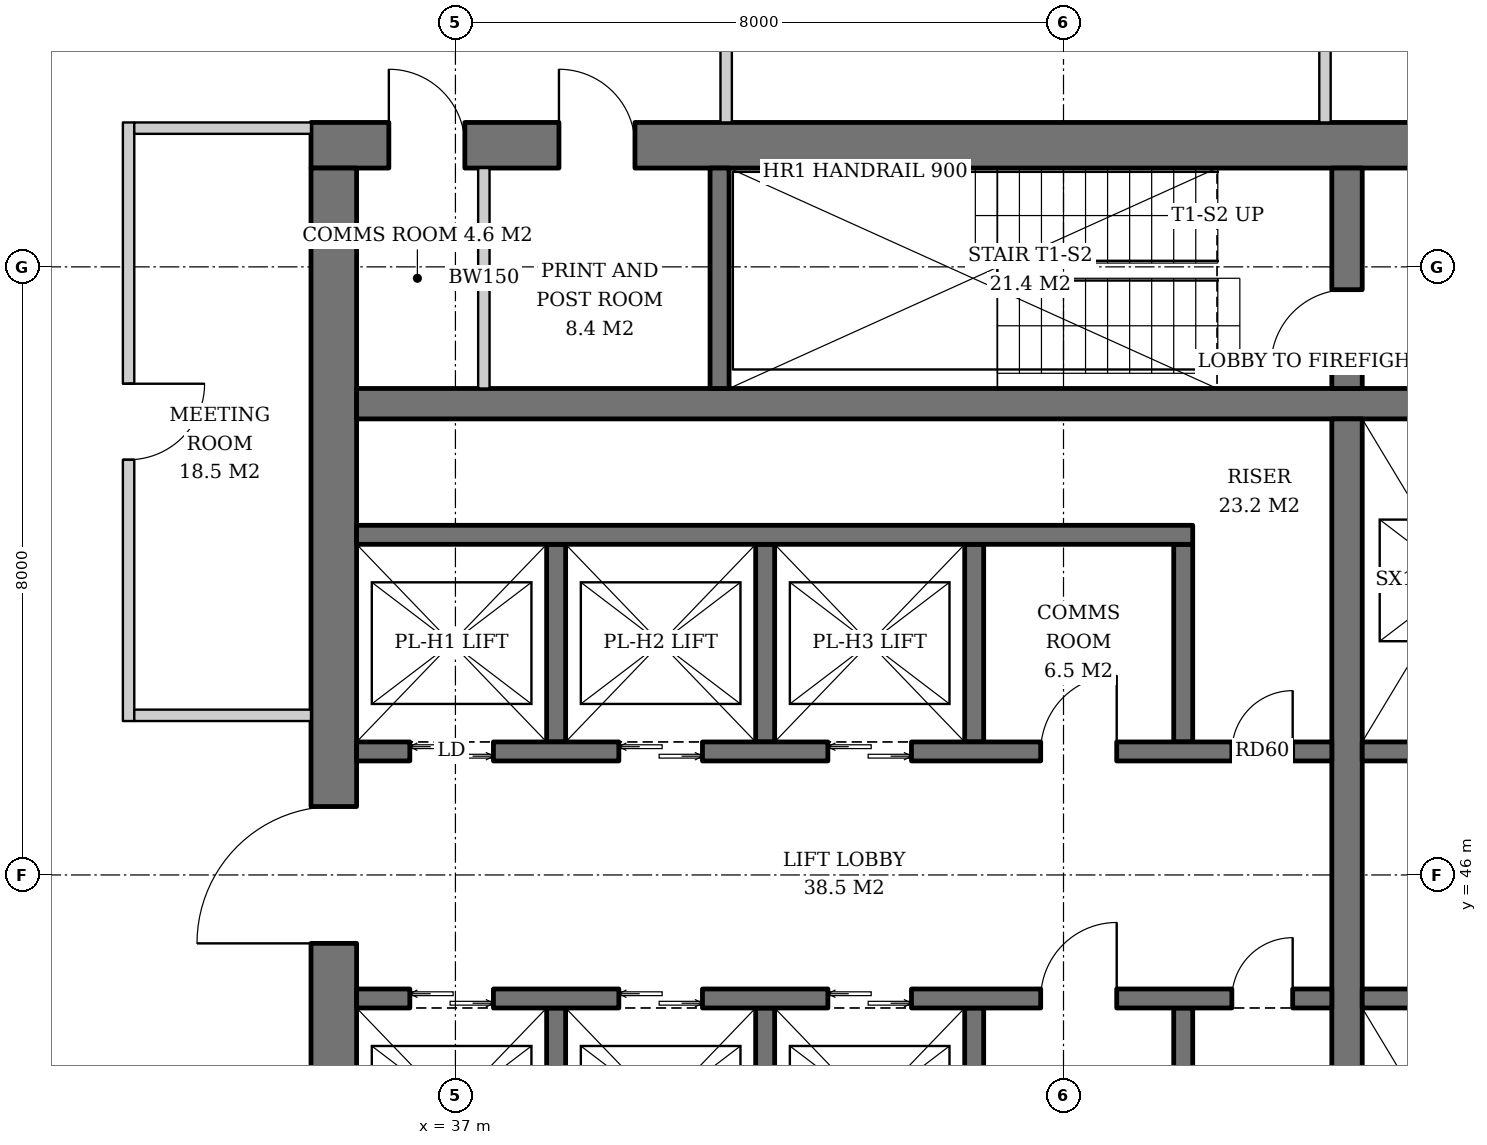
"""IFC4 building model, lengths in metres.
Left out: names, types, materials, properties, quantities, classifications, styles, units other than length and angle.
Written with IfcOpenShell. Run it as: python <this file> out.ifc"""

import sys

from ifc_helpers import new_model, si_unit, direction, frame, frame_2d, origin, place, context, subcontext, project, spatial, rectangle, extrude, element, fill, save


model = new_model("IFC4")
c1 = context("Model", 3, precision=1e-05, world=origin(), true_north=direction((0.0, 1.0)))
c2 = subcontext(c1, "Body", "Model", "MODEL_VIEW")
j1 = project(units=[si_unit("LENGTHUNIT", "METRE"), si_unit("PLANEANGLEUNIT", "RADIAN")], contexts=[c1])
p1 = place(None, origin())
s1 = spatial("IfcSite", under=j1, at=p1, CompositionType="ELEMENT")
p2 = place(p1, origin())
s2 = spatial("IfcBuilding", under=s1, at=p2, CompositionType="ELEMENT")
p3 = place(p2, frame((0.0, 0.0, 176.8)))
s3 = spatial("IfcBuildingStorey", under=s2, at=p3, CompositionType="ELEMENT", Elevation=176.8)
p4 = place(p3, frame((35.1, 55.6, 0.0), z_axis=(0.0, 0.0, 1.0), x_axis=(1.0, 0.0, 0.0)))
e1 = element("IfcWall", 1, at=p4, inside=s3, PredefinedType="SHEAR", context=c2, shape_type="SweptSolid", body=[
    extrude(rectangle(XDim=19.8, YDim=0.6, at=frame_2d((9.9, 0.0))), origin(), (0.0, 0.0, 1.0), 3.8),
])
p5 = place(p4, frame((14.54, 0.0, 0.0)))
e2 = element("IfcOpeningElement", 2, at=p5, cuts=e1, PredefinedType="OPENING", context=c2, shape_type="SweptSolid", body=[
    extrude(rectangle(XDim=1.0, YDim=2.1, at=frame_2d((0.5, 1.05))), frame((0.0, 0.31, 0.0), z_axis=(0.0, -1.0, 0.0), x_axis=(1.0, 0.0, 0.0)), (0.0, 0.0, 1.0), 0.62),
])
p6 = place(p4, frame((1.024, 0.0, 0.0)))
e3 = element("IfcOpeningElement", 3, at=p6, cuts=e1, PredefinedType="OPENING", context=c2, shape_type="SweptSolid", body=[
    extrude(rectangle(XDim=1.0, YDim=2.1, at=frame_2d((0.5, 1.05))), frame((0.0, 0.31, 0.0), z_axis=(0.0, -1.0, 0.0), x_axis=(1.0, 0.0, 0.0)), (0.0, 0.0, 1.0), 0.62),
])
p7 = place(p4, frame((3.262, 0.0, 0.0)))
e4 = element("IfcOpeningElement", 4, at=p7, cuts=e1, PredefinedType="OPENING", context=c2, shape_type="SweptSolid", body=[
    extrude(rectangle(XDim=1.0, YDim=2.1, at=frame_2d((0.5, 1.05))), frame((0.0, 0.31, 0.0), z_axis=(0.0, -1.0, 0.0), x_axis=(1.0, 0.0, 0.0)), (0.0, 0.0, 1.0), 0.62),
])
p8 = place(p3, frame((35.4, 36.7, 0.0), z_axis=(0.0, 0.0, 1.0), x_axis=(0.0, 1.0, 0.0)))
e5 = element("IfcWall", 5, at=p8, inside=s3, PredefinedType="SHEAR", context=c2, shape_type="SweptSolid", body=[
    extrude(rectangle(XDim=18.6, YDim=0.6, at=frame_2d((9.3, 0.0))), origin(), (0.0, 0.0, 1.0), 3.8),
])
p9 = place(p8, frame((8.4, 0.0, 0.0)))
e6 = element("IfcOpeningElement", 6, at=p9, cuts=e5, PredefinedType="OPENING", context=c2, shape_type="SweptSolid", body=[
    extrude(rectangle(XDim=1.8, YDim=2.4, at=frame_2d((0.9, 1.2))), frame((0.0, 0.31, 0.0), z_axis=(0.0, -1.0, 0.0), x_axis=(1.0, 0.0, 0.0)), (0.0, 0.0, 1.0), 0.62),
])
p10 = place(p3, frame((35.7, 52.2, 0.0), z_axis=(0.0, 0.0, 1.0), x_axis=(1.0, 0.0, 0.0)))
e7 = element("IfcWall", 7, at=p10, inside=s3, PredefinedType="SHEAR", context=c2, shape_type="SweptSolid", body=[
    extrude(rectangle(XDim=18.6, YDim=0.4, at=frame_2d((9.3, 0.0))), origin(), (0.0, 0.0, 1.0), 3.8),
])
p11 = place(p3, frame((48.73, 40.0, 0.0), z_axis=(0.0, 0.0, 1.0), x_axis=(0.0, 1.0, 0.0)))
e8 = element("IfcWall", 8, at=p11, inside=s3, PredefinedType="SHEAR", context=c2, shape_type="SweptSolid", body=[
    extrude(rectangle(XDim=12.0, YDim=0.4, at=frame_2d((6.0, 0.0))), origin(), (0.0, 0.0, 1.0), 3.8),
])
p12 = place(p3, frame((48.73, 52.4, 0.0), z_axis=(0.0, 0.0, 1.0), x_axis=(0.0, 1.0, 0.0)))
e9 = element("IfcWall", 9, at=p12, inside=s3, PredefinedType="SHEAR", context=c2, shape_type="SweptSolid", body=[
    extrude(rectangle(XDim=2.9, YDim=0.4, at=frame_2d((1.45, 0.0))), origin(), (0.0, 0.0, 1.0), 3.8),
])
p13 = place(p12, frame((0.3, 0.0, 0.0)))
e10 = element("IfcOpeningElement", 10, at=p13, cuts=e9, PredefinedType="OPENING", context=c2, shape_type="SweptSolid", body=[
    extrude(rectangle(XDim=1.0, YDim=2.1, at=frame_2d((0.5, 1.05))), frame((0.0, 0.21, 0.0), z_axis=(0.0, -1.0, 0.0), x_axis=(1.0, 0.0, 0.0)), (0.0, 0.0, 1.0), 0.42),
])
p14 = place(p3, frame((40.475, 52.4, 0.0), z_axis=(0.0, 0.0, 1.0), x_axis=(0.0, 1.0, 0.0)))
e11 = element("IfcWall", 11, at=p14, inside=s3, PredefinedType="SHEAR", context=c2, shape_type="SweptSolid", body=[
    extrude(rectangle(XDim=2.9, YDim=0.25, at=frame_2d((1.45, 0.0))), origin(), (0.0, 0.0, 1.0), 3.8),
])
for number, where, z_axis, x_axis in (
    (12, (38.325, 47.75, 0.0), (0.0, 0.0, 1.0), (0.0, 1.0, 0.0)),
    (13, (41.075, 47.75, 0.0), (0.0, 0.0, 1.0), (0.0, 1.0, 0.0)),
    (14, (43.825, 47.75, 0.0), (0.0, 0.0, 1.0), (0.0, 1.0, 0.0)),
    (15, (46.575, 47.75, 0.0), (0.0, 0.0, 1.0), (0.0, 1.0, 0.0)),
):
    element("IfcWall", number, at=place(p3, frame(where, z_axis=z_axis, x_axis=x_axis)), inside=s3, PredefinedType="SHEAR", context=c2, shape_type="SweptSolid", body=[
        extrude(rectangle(XDim=2.6, YDim=0.25, at=frame_2d((1.3, 0.0))), origin(), (0.0, 0.0, 1.0), 3.8),
    ])
p15 = place(p3, frame((35.7, 50.475, 0.0), z_axis=(0.0, 0.0, 1.0), x_axis=(1.0, 0.0, 0.0)))
e16 = element("IfcWall", 16, at=p15, inside=s3, PredefinedType="SHEAR", context=c2, shape_type="SweptSolid", body=[
    extrude(rectangle(XDim=11.0, YDim=0.25, at=frame_2d((5.5, 0.0))), origin(), (0.0, 0.0, 1.0), 3.8),
])
p16 = place(p3, frame((35.7, 47.625, 0.0), z_axis=(0.0, 0.0, 1.0), x_axis=(1.0, 0.0, 0.0)))
e17 = element("IfcWall", 17, at=p16, inside=s3, PredefinedType="SHEAR", context=c2, shape_type="SweptSolid", body=[
    extrude(rectangle(XDim=12.83, YDim=0.25, at=frame_2d((6.415, 0.0))), origin(), (0.0, 0.0, 1.0), 3.8),
])
p17 = place(p16, frame((0.7, 0.0, 0.0)))
e18 = element("IfcOpeningElement", 18, at=p17, cuts=e17, PredefinedType="OPENING", context=c2, shape_type="SweptSolid", body=[
    extrude(rectangle(XDim=1.1, YDim=2.2, at=frame_2d((0.55, 1.1))), frame((0.0, 0.135, 0.0), z_axis=(0.0, -1.0, 0.0), x_axis=(1.0, 0.0, 0.0)), (0.0, 0.0, 1.0), 0.27),
])
p18 = place(p16, frame((3.45, 0.0, 0.0)))
e19 = element("IfcOpeningElement", 19, at=p18, cuts=e17, PredefinedType="OPENING", context=c2, shape_type="SweptSolid", body=[
    extrude(rectangle(XDim=1.1, YDim=2.2, at=frame_2d((0.55, 1.1))), frame((0.0, 0.135, 0.0), z_axis=(0.0, -1.0, 0.0), x_axis=(1.0, 0.0, 0.0)), (0.0, 0.0, 1.0), 0.27),
])
p19 = place(p16, frame((6.2, 0.0, 0.0)))
e20 = element("IfcOpeningElement", 20, at=p19, cuts=e17, PredefinedType="OPENING", context=c2, shape_type="SweptSolid", body=[
    extrude(rectangle(XDim=1.1, YDim=2.2, at=frame_2d((0.55, 1.1))), frame((0.0, 0.135, 0.0), z_axis=(0.0, -1.0, 0.0), x_axis=(1.0, 0.0, 0.0)), (0.0, 0.0, 1.0), 0.27),
])
p20 = place(p16, frame((9.0, 0.0, 0.0)))
e21 = element("IfcOpeningElement", 21, at=p20, cuts=e17, PredefinedType="OPENING", context=c2, shape_type="SweptSolid", body=[
    extrude(rectangle(XDim=1.0, YDim=2.1, at=frame_2d((0.5, 1.05))), frame((0.0, 0.135, 0.0), z_axis=(0.0, -1.0, 0.0), x_axis=(1.0, 0.0, 0.0)), (0.0, 0.0, 1.0), 0.27),
])
p21 = place(p16, frame((11.515, 0.0, 0.0)))
e22 = element("IfcOpeningElement", 22, at=p21, cuts=e17, PredefinedType="OPENING", context=c2, shape_type="SweptSolid", body=[
    extrude(rectangle(XDim=0.8, YDim=2.0, at=frame_2d((0.4, 1.0))), frame((0.0, 0.135, 0.0), z_axis=(0.0, -1.0, 0.0), x_axis=(1.0, 0.0, 0.0)), (0.0, 0.0, 1.0), 0.27),
])
for number, where, z_axis, x_axis in (
    (23, (38.325, 44.25, 0.0), (0.0, 0.0, 1.0), (0.0, -1.0, 0.0)),
    (24, (41.075, 44.25, 0.0), (0.0, 0.0, 1.0), (0.0, -1.0, 0.0)),
    (25, (43.825, 44.25, 0.0), (0.0, 0.0, 1.0), (0.0, -1.0, 0.0)),
    (26, (46.575, 44.25, 0.0), (0.0, 0.0, 1.0), (0.0, -1.0, 0.0)),
):
    element("IfcWall", number, at=place(p3, frame(where, z_axis=z_axis, x_axis=x_axis)), inside=s3, PredefinedType="SHEAR", context=c2, shape_type="SweptSolid", body=[
        extrude(rectangle(XDim=2.6, YDim=0.25, at=frame_2d((1.3, 0.0))), origin(), (0.0, 0.0, 1.0), 3.8),
    ])
p22 = place(p3, frame((35.7, 44.375, 0.0), z_axis=(0.0, 0.0, 1.0), x_axis=(1.0, 0.0, 0.0)))
e27 = element("IfcWall", 27, at=p22, inside=s3, PredefinedType="SHEAR", context=c2, shape_type="SweptSolid", body=[
    extrude(rectangle(XDim=12.83, YDim=0.25, at=frame_2d((6.415, 0.0))), origin(), (0.0, 0.0, 1.0), 3.8),
])
p23 = place(p22, frame((0.7, 0.0, 0.0)))
e28 = element("IfcOpeningElement", 28, at=p23, cuts=e27, PredefinedType="OPENING", context=c2, shape_type="SweptSolid", body=[
    extrude(rectangle(XDim=1.1, YDim=2.2, at=frame_2d((0.55, 1.1))), frame((0.0, 0.135, 0.0), z_axis=(0.0, -1.0, 0.0), x_axis=(1.0, 0.0, 0.0)), (0.0, 0.0, 1.0), 0.27),
])
p24 = place(p22, frame((3.45, 0.0, 0.0)))
e29 = element("IfcOpeningElement", 29, at=p24, cuts=e27, PredefinedType="OPENING", context=c2, shape_type="SweptSolid", body=[
    extrude(rectangle(XDim=1.1, YDim=2.2, at=frame_2d((0.55, 1.1))), frame((0.0, 0.135, 0.0), z_axis=(0.0, -1.0, 0.0), x_axis=(1.0, 0.0, 0.0)), (0.0, 0.0, 1.0), 0.27),
])
p25 = place(p22, frame((6.2, 0.0, 0.0)))
e30 = element("IfcOpeningElement", 30, at=p25, cuts=e27, PredefinedType="OPENING", context=c2, shape_type="SweptSolid", body=[
    extrude(rectangle(XDim=1.1, YDim=2.2, at=frame_2d((0.55, 1.1))), frame((0.0, 0.135, 0.0), z_axis=(0.0, -1.0, 0.0), x_axis=(1.0, 0.0, 0.0)), (0.0, 0.0, 1.0), 0.27),
])
p26 = place(p22, frame((9.0, 0.0, 0.0)))
e31 = element("IfcOpeningElement", 31, at=p26, cuts=e27, PredefinedType="OPENING", context=c2, shape_type="SweptSolid", body=[
    extrude(rectangle(XDim=1.0, YDim=2.1, at=frame_2d((0.5, 1.05))), frame((0.0, 0.135, 0.0), z_axis=(0.0, -1.0, 0.0), x_axis=(1.0, 0.0, 0.0)), (0.0, 0.0, 1.0), 0.27),
])
p27 = place(p22, frame((11.515, 0.0, 0.0)))
e32 = element("IfcOpeningElement", 32, at=p27, cuts=e27, PredefinedType="OPENING", context=c2, shape_type="SweptSolid", body=[
    extrude(rectangle(XDim=0.8, YDim=2.0, at=frame_2d((0.4, 1.0))), frame((0.0, 0.135, 0.0), z_axis=(0.0, -1.0, 0.0), x_axis=(1.0, 0.0, 0.0)), (0.0, 0.0, 1.0), 0.27),
])
for number, where, z_axis, x_axis in (
    (33, (48.93, 47.625, 0.0), (0.0, 0.0, 1.0), (1.0, 0.0, 0.0)),
    (34, (48.93, 44.375, 0.0), (0.0, 0.0, 1.0), (1.0, 0.0, 0.0)),
):
    element("IfcWall", number, at=place(p3, frame(where, z_axis=z_axis, x_axis=x_axis)), inside=s3, PredefinedType="SHEAR", context=c2, shape_type="SweptSolid", body=[
        extrude(rectangle(XDim=5.37, YDim=0.25, at=frame_2d((2.685, 0.0))), origin(), (0.0, 0.0, 1.0), 3.8),
    ])
p28 = place(p3, frame((37.374, 52.4, 0.0), z_axis=(0.0, 0.0, 1.0), x_axis=(0.0, 1.0, 0.0)))
e35 = element("IfcWall", 35, at=p28, inside=s3, PredefinedType="SOLIDWALL", context=c2, shape_type="SweptSolid", body=[
    extrude(rectangle(XDim=2.9, YDim=0.15, at=frame_2d((1.45, 0.0))), origin(), (0.0, 0.0, 1.0), 3.62),
])
for number, where, z_axis, x_axis in (
    (36, (48.44, 55.9, 0.0), (0.0, 0.0, 1.0), (0.0, 1.0, 0.0)),
    (37, (40.562, 55.9, 0.0), (0.0, 0.0, 1.0), (0.0, 1.0, 0.0)),
):
    element("IfcWall", number, at=place(p3, frame(where, z_axis=z_axis, x_axis=x_axis)), inside=s3, PredefinedType="PARTITIONING", context=c2, shape_type="SweptSolid", body=[
        extrude(rectangle(XDim=2.325, YDim=0.15, at=frame_2d((1.163, 0.0))), origin(), (0.0, 0.0, 1.0), 3.62),
    ])
p29 = place(p3, frame((32.7, 55.9, 0.0), z_axis=(0.0, 0.0, 1.0), x_axis=(0.0, -1.0, 0.0)))
e38 = element("IfcWall", 38, at=p29, inside=s3, PredefinedType="PARTITIONING", context=c2, shape_type="SweptSolid", body=[
    extrude(rectangle(XDim=7.875, YDim=0.15, at=frame_2d((3.938, 0.0))), origin(), (0.0, 0.0, 1.0), 2.867),
])
p30 = place(p29, frame((3.438, 0.0, 0.0)))
e39 = element("IfcOpeningElement", 39, at=p30, cuts=e38, PredefinedType="OPENING", context=c2, shape_type="SweptSolid", body=[
    extrude(rectangle(XDim=1.0, YDim=2.1, at=frame_2d((0.5, 1.05))), frame((0.0, 0.085, 0.0), z_axis=(0.0, -1.0, 0.0), x_axis=(1.0, 0.0, 0.0)), (0.0, 0.0, 1.0), 0.17),
])
p31 = place(p3, frame((35.1, 55.825, 0.0), z_axis=(0.0, 0.0, 1.0), x_axis=(-1.0, 0.0, 0.0)))
e40 = element("IfcWall", 40, at=p31, inside=s3, PredefinedType="PARTITIONING", context=c2, shape_type="SweptSolid", body=[
    extrude(rectangle(XDim=2.325, YDim=0.15, at=frame_2d((1.163, 0.0))), origin(), (0.0, 0.0, 1.0), 2.867),
])
p32 = place(p3, frame((35.1, 48.1, 0.0), z_axis=(0.0, 0.0, 1.0), x_axis=(-1.0, 0.0, 0.0)))
e41 = element("IfcWall", 41, at=p32, inside=s3, PredefinedType="PARTITIONING", context=c2, shape_type="SweptSolid", body=[
    extrude(rectangle(XDim=2.325, YDim=0.15, at=frame_2d((1.163, 0.0))), origin(), (0.0, 0.0, 1.0), 3.62),
])
p33 = place(p17, origin())
e42 = element("IfcDoor", 42, at=p33, inside=s3, OperationType="DOUBLE_DOOR_SLIDING", PredefinedType="DOOR", context=c2, shape_type="SweptSolid", body=[
    extrude(rectangle(XDim=1.1, YDim=2.2, at=frame_2d((0.55, 1.1))), frame((0.0, 0.025, 0.0), z_axis=(0.0, -1.0, 0.0), x_axis=(1.0, 0.0, 0.0)), (0.0, 0.0, 1.0), 0.05),
])
fill(e18, e42)
p34 = place(p18, origin())
e43 = element("IfcDoor", 43, at=p34, inside=s3, OperationType="DOUBLE_DOOR_SLIDING", PredefinedType="DOOR", context=c2, shape_type="SweptSolid", body=[
    extrude(rectangle(XDim=1.1, YDim=2.2, at=frame_2d((0.55, 1.1))), frame((0.0, 0.025, 0.0), z_axis=(0.0, -1.0, 0.0), x_axis=(1.0, 0.0, 0.0)), (0.0, 0.0, 1.0), 0.05),
])
fill(e19, e43)
p35 = place(p19, origin())
e44 = element("IfcDoor", 44, at=p35, inside=s3, OperationType="DOUBLE_DOOR_SLIDING", PredefinedType="DOOR", context=c2, shape_type="SweptSolid", body=[
    extrude(rectangle(XDim=1.1, YDim=2.2, at=frame_2d((0.55, 1.1))), frame((0.0, 0.025, 0.0), z_axis=(0.0, -1.0, 0.0), x_axis=(1.0, 0.0, 0.0)), (0.0, 0.0, 1.0), 0.05),
])
fill(e20, e44)
p36 = place(p20, origin())
e45 = element("IfcDoor", 45, at=p36, inside=s3, OperationType="SINGLE_SWING_RIGHT", PredefinedType="DOOR", context=c2, shape_type="SweptSolid", body=[
    extrude(rectangle(XDim=1.0, YDim=2.1, at=frame_2d((0.5, 1.05))), frame((0.0, 0.025, 0.0), z_axis=(0.0, -1.0, 0.0), x_axis=(1.0, 0.0, 0.0)), (0.0, 0.0, 1.0), 0.05),
])
fill(e21, e45)
p37 = place(p21, origin())
e46 = element("IfcDoor", 46, at=p37, inside=s3, OperationType="SINGLE_SWING_RIGHT", PredefinedType="DOOR", context=c2, shape_type="SweptSolid", body=[
    extrude(rectangle(XDim=0.8, YDim=2.0, at=frame_2d((0.4, 1.0))), frame((0.0, 0.025, 0.0), z_axis=(0.0, -1.0, 0.0), x_axis=(1.0, 0.0, 0.0)), (0.0, 0.0, 1.0), 0.05),
])
fill(e22, e46)
p38 = place(p23, origin())
e47 = element("IfcDoor", 47, at=p38, inside=s3, OperationType="DOUBLE_DOOR_SLIDING", PredefinedType="DOOR", context=c2, shape_type="SweptSolid", body=[
    extrude(rectangle(XDim=1.1, YDim=2.2, at=frame_2d((0.55, 1.1))), frame((0.0, 0.025, 0.0), z_axis=(0.0, -1.0, 0.0), x_axis=(1.0, 0.0, 0.0)), (0.0, 0.0, 1.0), 0.05),
])
fill(e28, e47)
p39 = place(p24, origin())
e48 = element("IfcDoor", 48, at=p39, inside=s3, OperationType="DOUBLE_DOOR_SLIDING", PredefinedType="DOOR", context=c2, shape_type="SweptSolid", body=[
    extrude(rectangle(XDim=1.1, YDim=2.2, at=frame_2d((0.55, 1.1))), frame((0.0, 0.025, 0.0), z_axis=(0.0, -1.0, 0.0), x_axis=(1.0, 0.0, 0.0)), (0.0, 0.0, 1.0), 0.05),
])
fill(e29, e48)
p40 = place(p25, origin())
e49 = element("IfcDoor", 49, at=p40, inside=s3, OperationType="DOUBLE_DOOR_SLIDING", PredefinedType="DOOR", context=c2, shape_type="SweptSolid", body=[
    extrude(rectangle(XDim=1.1, YDim=2.2, at=frame_2d((0.55, 1.1))), frame((0.0, 0.025, 0.0), z_axis=(0.0, -1.0, 0.0), x_axis=(1.0, 0.0, 0.0)), (0.0, 0.0, 1.0), 0.05),
])
fill(e30, e49)
p41 = place(p26, origin())
e50 = element("IfcDoor", 50, at=p41, inside=s3, OperationType="SINGLE_SWING_RIGHT", PredefinedType="DOOR", context=c2, shape_type="SweptSolid", body=[
    extrude(rectangle(XDim=1.0, YDim=2.1, at=frame_2d((0.5, 1.05))), frame((0.0, 0.025, 0.0), z_axis=(0.0, -1.0, 0.0), x_axis=(1.0, 0.0, 0.0)), (0.0, 0.0, 1.0), 0.05),
])
fill(e31, e50)
p42 = place(p27, origin())
e51 = element("IfcDoor", 51, at=p42, inside=s3, OperationType="SINGLE_SWING_RIGHT", PredefinedType="DOOR", context=c2, shape_type="SweptSolid", body=[
    extrude(rectangle(XDim=0.8, YDim=2.0, at=frame_2d((0.4, 1.0))), frame((0.0, 0.025, 0.0), z_axis=(0.0, -1.0, 0.0), x_axis=(1.0, 0.0, 0.0)), (0.0, 0.0, 1.0), 0.05),
])
fill(e32, e51)
p43 = place(p13, origin())
e52 = element("IfcDoor", 52, at=p43, inside=s3, OperationType="SINGLE_SWING_LEFT", PredefinedType="DOOR", context=c2, shape_type="SweptSolid", body=[
    extrude(rectangle(XDim=1.0, YDim=2.1, at=frame_2d((0.5, 1.05))), frame((0.0, 0.025, 0.0), z_axis=(0.0, -1.0, 0.0), x_axis=(1.0, 0.0, 0.0)), (0.0, 0.0, 1.0), 0.05),
])
fill(e10, e52)
p44 = place(p9, origin())
e53 = element("IfcDoor", 53, at=p44, inside=s3, OperationType="DOUBLE_DOOR_SINGLE_SWING", PredefinedType="DOOR", context=c2, shape_type="SweptSolid", body=[
    extrude(rectangle(XDim=1.8, YDim=2.4, at=frame_2d((0.9, 1.2))), frame((0.0, 0.025, 0.0), z_axis=(0.0, -1.0, 0.0), x_axis=(1.0, 0.0, 0.0)), (0.0, 0.0, 1.0), 0.05),
])
fill(e6, e53)
p45 = place(p6, origin())
e54 = element("IfcDoor", 54, at=p45, inside=s3, OperationType="SINGLE_SWING_LEFT", PredefinedType="DOOR", context=c2, shape_type="SweptSolid", body=[
    extrude(rectangle(XDim=1.0, YDim=2.1, at=frame_2d((0.5, 1.05))), frame((0.0, -0.24, 0.0), z_axis=(0.0, -1.0, 0.0), x_axis=(1.0, 0.0, 0.0)), (0.0, 0.0, 1.0), 0.05),
])
fill(e3, e54)
p46 = place(p7, origin())
e55 = element("IfcDoor", 55, at=p46, inside=s3, OperationType="SINGLE_SWING_LEFT", PredefinedType="DOOR", context=c2, shape_type="SweptSolid", body=[
    extrude(rectangle(XDim=1.0, YDim=2.1, at=frame_2d((0.5, 1.05))), frame((0.0, -0.24, 0.0), z_axis=(0.0, -1.0, 0.0), x_axis=(1.0, 0.0, 0.0)), (0.0, 0.0, 1.0), 0.05),
])
fill(e4, e55)
p47 = place(p30, origin())
e56 = element("IfcDoor", 56, at=p47, inside=s3, OperationType="SINGLE_SWING_LEFT", PredefinedType="DOOR", context=c2, shape_type="SweptSolid", body=[
    extrude(rectangle(XDim=1.0, YDim=2.1, at=frame_2d((0.5, 1.05))), frame((0.0, 0.025, 0.0), z_axis=(0.0, -1.0, 0.0), x_axis=(1.0, 0.0, 0.0)), (0.0, 0.0, 1.0), 0.05),
])
fill(e39, e56)
save(model, sys.argv[1])
